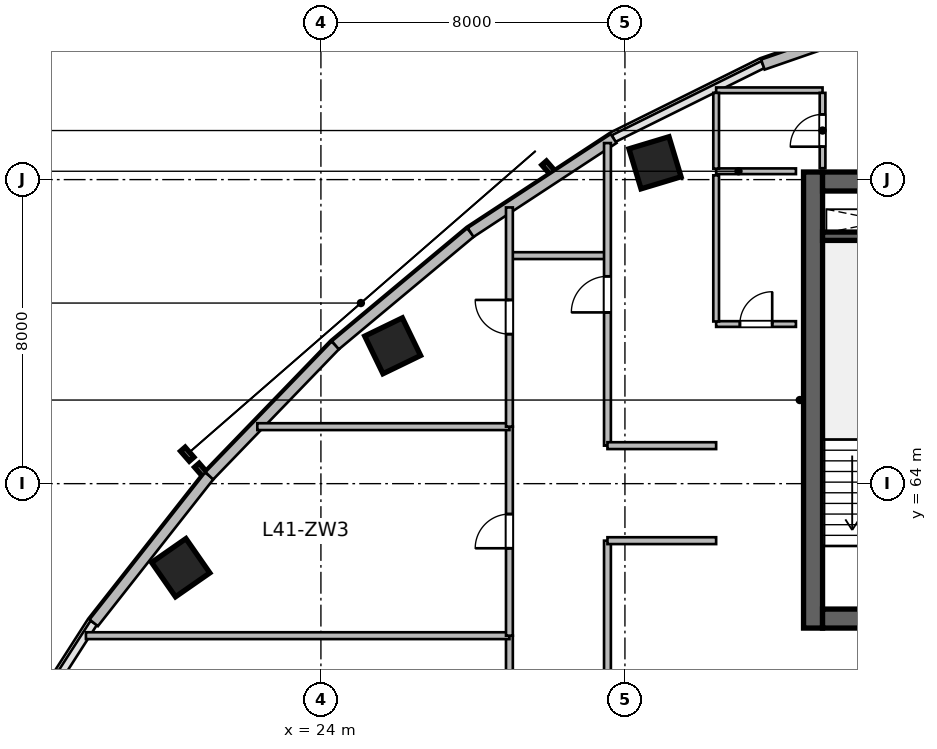
"""IFC4 building model, lengths in metres.
Left out: names, types, materials, properties, quantities, classifications, styles, units other than length and angle.
Written with IfcOpenShell. Run it as: python <this file> out.ifc"""

import sys

from ifc_helpers import new_model, si_unit, direction, frame, frame_2d, origin, origin_2d, place, context, subcontext, project, spatial, rectangle, extrude, source, transform, mapped, element, fill, save


model = new_model("IFC4")
c1 = context("Model", 3, precision=1e-05, world=origin(), true_north=direction((0.0, 1.0)))
c2 = subcontext(c1, "Body", "Model", "MODEL_VIEW")
j1 = project(units=[si_unit("LENGTHUNIT", "METRE"), si_unit("PLANEANGLEUNIT", "RADIAN")], contexts=[c1])
p1 = place(None, origin())
s1 = spatial("IfcSite", under=j1, at=p1, CompositionType="ELEMENT")
p2 = place(p1, origin())
s2 = spatial("IfcBuilding", under=s1, at=p2, CompositionType="ELEMENT")
p3 = place(p2, frame((0.0, 0.0, 170.1)))
s3 = spatial("IfcBuildingStorey", under=s2, at=p3, CompositionType="ELEMENT", Elevation=170.1)
m1 = source(origin(), c2, "Body", "SweptSolid", [
    extrude(rectangle(XDim=12.0, YDim=0.5, at=frame_2d((6.0, 0.0))), origin(), (0.0, 0.0, 1.0), 3.9),
])
p4 = place(p3, frame((36.95, 60.2, 0.0), z_axis=(0.0, 0.0, 1.0), x_axis=(0.0, 1.0, 0.0)))
e1 = element("IfcWall", 1, at=p4, inside=s3, PredefinedType="SHEAR", context=c2, shape_type="MappedRepresentation", body=[
    mapped(m1, transform((0.0, 0.0, 0.0), scale=1.0)),
])
m2 = source(origin(), c2, "Body", "SweptSolid", [
    extrude(rectangle(XDim=21.6, YDim=0.5, at=frame_2d((10.8, 0.0))), origin(), (0.0, 0.0, 1.0), 3.9),
])
p5 = place(p3, frame((37.2, 60.45, 0.0), z_axis=(0.0, 0.0, 1.0), x_axis=(1.0, 0.0, 0.0)))
e2 = element("IfcWall", 2, at=p5, inside=s3, PredefinedType="SHEAR", context=c2, shape_type="MappedRepresentation", body=[
    mapped(m2, transform((0.0, 0.0, 0.0), scale=1.0)),
])
p6 = place(p5, frame((1.1, 0.0, 0.0)))
e3 = element("IfcOpeningElement", 3, at=p6, cuts=e2, PredefinedType="OPENING", context=c2, shape_type="SweptSolid", body=[
    extrude(rectangle(XDim=1.15, YDim=2.15, at=frame_2d((0.575, 1.075))), frame((0.0, 0.26, 0.0), z_axis=(0.0, -1.0, 0.0), x_axis=(1.0, 0.0, 0.0)), (0.0, 0.0, 1.0), 0.52),
])
p7 = place(p5, frame((19.5, 0.0, 0.0)))
e4 = element("IfcOpeningElement", 4, at=p7, cuts=e2, PredefinedType="OPENING", context=c2, shape_type="SweptSolid", body=[
    extrude(rectangle(XDim=0.9, YDim=2.1, at=frame_2d((0.45, 1.05))), frame((0.0, 0.26, 0.0), z_axis=(0.0, -1.0, 0.0), x_axis=(1.0, 0.0, 0.0)), (0.0, 0.0, 1.0), 0.52),
])
p8 = place(p5, frame((12.02, 0.0, 0.0)))
e5 = element("IfcOpeningElement", 5, at=p8, cuts=e2, PredefinedType="OPENING", context=c2, shape_type="SweptSolid", body=[
    extrude(rectangle(XDim=1.6, YDim=2.15, at=frame_2d((0.8, 1.075))), frame((0.0, 0.26, 0.0), z_axis=(0.0, -1.0, 0.0), x_axis=(1.0, 0.0, 0.0)), (0.0, 0.0, 1.0), 0.52),
])
p9 = place(p3, frame((37.2, 71.95, 0.0), z_axis=(0.0, 0.0, 1.0), x_axis=(1.0, 0.0, 0.0)))
e6 = element("IfcWall", 6, at=p9, inside=s3, PredefinedType="SHEAR", context=c2, shape_type="MappedRepresentation", body=[
    mapped(m2, transform((0.0, 0.0, 0.0), scale=1.0)),
])
p10 = place(p9, frame((1.2, 0.0, 0.0)))
e7 = element("IfcOpeningElement", 7, at=p10, cuts=e6, PredefinedType="OPENING", context=c2, shape_type="SweptSolid", body=[
    extrude(rectangle(XDim=0.9, YDim=2.1, at=frame_2d((0.45, 1.05))), frame((0.0, 0.26, 0.0), z_axis=(0.0, -1.0, 0.0), x_axis=(1.0, 0.0, 0.0)), (0.0, 0.0, 1.0), 0.52),
])
p11 = place(p9, frame((14.7, 0.0, 0.0)))
e8 = element("IfcOpeningElement", 8, at=p11, cuts=e6, PredefinedType="OPENING", context=c2, shape_type="SweptSolid", body=[
    extrude(rectangle(XDim=1.2, YDim=2.15, at=frame_2d((0.6, 1.075))), frame((0.0, 0.26, 0.0), z_axis=(0.0, -1.0, 0.0), x_axis=(1.0, 0.0, 0.0)), (0.0, 0.0, 1.0), 0.52),
])
p12 = place(p9, frame((4.15, 0.0, 0.0)))
e9 = element("IfcOpeningElement", 9, at=p12, cuts=e6, PredefinedType="OPENING", context=c2, shape_type="SweptSolid", body=[
    extrude(rectangle(XDim=1.3, YDim=2.15, at=frame_2d((0.65, 1.075))), frame((0.0, 0.26, 0.0), z_axis=(0.0, -1.0, 0.0), x_axis=(1.0, 0.0, 0.0)), (0.0, 0.0, 1.0), 0.52),
])
p13 = place(p9, frame((7.25, 0.0, 0.0)))
e10 = element("IfcOpeningElement", 10, at=p13, cuts=e6, PredefinedType="OPENING", context=c2, shape_type="SweptSolid", body=[
    extrude(rectangle(XDim=0.9, YDim=2.1, at=frame_2d((0.45, 1.05))), frame((0.0, 0.26, 0.0), z_axis=(0.0, -1.0, 0.0), x_axis=(1.0, 0.0, 0.0)), (0.0, 0.0, 1.0), 0.52),
])
p14 = place(p9, frame((10.95, 0.0, 0.0)))
e11 = element("IfcOpeningElement", 11, at=p14, cuts=e6, PredefinedType="OPENING", context=c2, shape_type="SweptSolid", body=[
    extrude(rectangle(XDim=0.9, YDim=2.1, at=frame_2d((0.45, 1.05))), frame((0.0, 0.26, 0.0), z_axis=(0.0, -1.0, 0.0), x_axis=(1.0, 0.0, 0.0)), (0.0, 0.0, 1.0), 0.52),
])
m3 = source(origin(), c2, "Body", "SweptSolid", [
    extrude(rectangle(XDim=3.27, YDim=0.22, at=frame_2d((1.635, 0.0))), origin(), (0.0, 0.0, 1.0), 3.9),
])
p15 = place(p3, frame((37.2, 70.51, 0.0), z_axis=(0.0, 0.0, 1.0), x_axis=(1.0, 0.0, 0.0)))
e12 = element("IfcWall", 12, at=p15, inside=s3, PredefinedType="SHEAR", context=c2, shape_type="MappedRepresentation", body=[
    mapped(m3, transform((0.0, 0.0, 0.0), scale=1.0)),
])
m4 = source(origin(), c2, "Body", "SweptSolid", [
    extrude(rectangle(XDim=1.1, YDim=1.1, at=origin_2d()), origin(), (0.0, 0.0, 1.0), 3.9),
])
for number, where, z_axis, x_axis in (
    (13, (20.311, 61.789, 0.0), (0.0, 0.0, 1.0), (-0.571, 0.821, 0.0)),
    (14, (25.888, 67.627, 0.0), (0.0, 0.0, 1.0), (-0.436, 0.9, 0.0)),
    (15, (32.791, 72.442, 0.0), (0.0, 0.0, 1.0), (-0.289, 0.957, 0.0)),
):
    element("IfcColumn", number, at=place(p3, frame(where, z_axis=z_axis, x_axis=x_axis)), inside=s3, PredefinedType="COLUMN", context=c2, shape_type="MappedRepresentation", body=[
        mapped(m4, transform((0.0, 0.0, 0.0), scale=1.0)),
    ])
m5 = source(origin(), c2, "Body", "SweptSolid", [
    extrude(rectangle(XDim=4.922, YDim=0.28, at=frame_2d((2.461, 0.0))), origin(), (0.0, 0.0, 1.0), 3.65),
])
p16 = place(p3, frame((18.021, 60.338, 0.0), z_axis=(0.0, 0.0, 1.0), x_axis=(0.61817639101, 0.786039407153, 0.0)))
e16 = element("IfcWall", 16, at=p16, inside=s3, PredefinedType="SOLIDWALL", context=c2, shape_type="MappedRepresentation", body=[
    mapped(m5, transform((0.0, 0.0, 0.0), scale=1.0)),
])
m6 = source(origin(), c2, "Body", "SweptSolid", [
    extrude(rectangle(XDim=4.776, YDim=0.28, at=frame_2d((2.388, 0.0))), origin(), (0.0, 0.0, 1.0), 3.65),
])
p17 = place(p3, frame((21.064, 64.206, 0.0), z_axis=(0.0, 0.0, 1.0), x_axis=(0.694601811851, 0.719394414055, 0.0)))
e17 = element("IfcWall", 17, at=p17, inside=s3, PredefinedType="SOLIDWALL", context=c2, shape_type="MappedRepresentation", body=[
    mapped(m6, transform((0.0, 0.0, 0.0), scale=1.0)),
])
m7 = source(origin(), c2, "Body", "SweptSolid", [
    extrude(rectangle(XDim=4.634, YDim=0.28, at=frame_2d((2.317, 0.0))), origin(), (0.0, 0.0, 1.0), 3.65),
])
p18 = place(p3, frame((24.381, 67.642, 0.0), z_axis=(0.0, 0.0, 1.0), x_axis=(0.767910229096, 0.640557475993, 0.0)))
e18 = element("IfcWall", 18, at=p18, inside=s3, PredefinedType="SOLIDWALL", context=c2, shape_type="MappedRepresentation", body=[
    mapped(m7, transform((0.0, 0.0, 0.0), scale=1.0)),
])
m8 = source(origin(), c2, "Body", "SweptSolid", [
    extrude(rectangle(XDim=4.501, YDim=0.28, at=frame_2d((2.25, 0.0))), origin(), (0.0, 0.0, 1.0), 3.65),
])
p19 = place(p3, frame((27.939, 70.61, 0.0), z_axis=(0.0, 0.0, 1.0), x_axis=(0.835984920737, 0.548752414391, 0.0)))
e19 = element("IfcWall", 19, at=p19, inside=s3, PredefinedType="SOLIDWALL", context=c2, shape_type="MappedRepresentation", body=[
    mapped(m8, transform((0.0, 0.0, 0.0), scale=1.0)),
])
m9 = source(origin(), c2, "Body", "SweptSolid", [
    extrude(rectangle(XDim=4.29, YDim=0.28, at=frame_2d((2.145, 0.0))), origin(), (0.0, 0.0, 1.0), 3.65),
])
p20 = place(p3, frame((35.63, 75.027, 0.0), z_axis=(0.0, 0.0, 1.0), x_axis=(0.944883859218, 0.3274057003, 0.0)))
e20 = element("IfcWall", 20, at=p20, inside=s3, PredefinedType="SOLIDWALL", context=c2, shape_type="MappedRepresentation", body=[
    mapped(m9, transform((0.0, 0.0, 0.0), scale=1.0)),
])
m10 = source(origin(), c2, "Body", "SweptSolid", [
    extrude(rectangle(XDim=2.1, YDim=0.15, at=frame_2d((1.05, 0.0))), origin(), (0.0, 0.0, 1.0), 3.65),
])
p21 = place(p3, frame((34.4, 72.22, 0.0), z_axis=(0.0, 0.0, 1.0), x_axis=(1.0, 0.0, 0.0)))
e21 = element("IfcWall", 21, at=p21, inside=s3, PredefinedType="PARTITIONING", context=c2, shape_type="MappedRepresentation", body=[
    mapped(m10, transform((0.0, 0.0, 0.0), scale=1.0)),
])
m11 = source(origin(), c2, "Body", "SweptSolid", [
    extrude(rectangle(XDim=2.8, YDim=0.15, at=frame_2d((1.4, 0.0))), origin(), (0.0, 0.0, 1.0), 3.65),
])
p22 = place(p3, frame((34.4, 74.35, 0.0), z_axis=(0.0, 0.0, 1.0), x_axis=(1.0, 0.0, 0.0)))
e22 = element("IfcWall", 22, at=p22, inside=s3, PredefinedType="PARTITIONING", context=c2, shape_type="MappedRepresentation", body=[
    mapped(m11, transform((0.0, 0.0, 0.0), scale=1.0)),
])
m12 = source(origin(), c2, "Body", "SweptSolid", [
    extrude(rectangle(XDim=1.995, YDim=0.15, at=frame_2d((0.998, 0.0))), origin(), (0.0, 0.0, 1.0), 3.65),
])
p23 = place(p3, frame((34.4, 72.288, 0.0), z_axis=(0.0, 0.0, 1.0), x_axis=(0.0, 1.0, 0.0)))
e23 = element("IfcWall", 23, at=p23, inside=s3, PredefinedType="PARTITIONING", context=c2, shape_type="MappedRepresentation", body=[
    mapped(m12, transform((0.0, 0.0, 0.0), scale=1.0)),
])
m13 = source(origin(), c2, "Body", "SweptSolid", [
    extrude(rectangle(XDim=1.982, YDim=0.15, at=frame_2d((0.991, 0.0))), origin(), (0.0, 0.0, 1.0), 3.65),
])
p24 = place(p3, frame((37.2, 72.3, 0.0), z_axis=(0.0, 0.0, 1.0), x_axis=(0.0, 1.0, 0.0)))
e24 = element("IfcWall", 24, at=p24, inside=s3, PredefinedType="PARTITIONING", context=c2, shape_type="MappedRepresentation", body=[
    mapped(m13, transform((0.0, 0.0, 0.0), scale=1.0)),
])
p25 = place(p24, frame((0.566, 0.0, 0.0)))
e25 = element("IfcOpeningElement", 25, at=p25, cuts=e24, PredefinedType="OPENING", context=c2, shape_type="SweptSolid", body=[
    extrude(rectangle(XDim=0.85, YDim=2.1, at=frame_2d((0.425, 1.05))), frame((0.0, 0.085, 0.0), z_axis=(0.0, -1.0, 0.0), x_axis=(1.0, 0.0, 0.0)), (0.0, 0.0, 1.0), 0.17),
])
p26 = place(p3, frame((34.4, 68.2, 0.0), z_axis=(0.0, 0.0, 1.0), x_axis=(1.0, 0.0, 0.0)))
e26 = element("IfcWall", 26, at=p26, inside=s3, PredefinedType="PARTITIONING", context=c2, shape_type="MappedRepresentation", body=[
    mapped(m10, transform((0.0, 0.0, 0.0), scale=1.0)),
])
p27 = place(p26, frame((0.625, 0.0, 0.0)))
e27 = element("IfcOpeningElement", 27, at=p27, cuts=e26, PredefinedType="OPENING", context=c2, shape_type="SweptSolid", body=[
    extrude(rectangle(XDim=0.85, YDim=2.1, at=frame_2d((0.425, 1.05))), frame((0.0, 0.085, 0.0), z_axis=(0.0, -1.0, 0.0), x_axis=(1.0, 0.0, 0.0)), (0.0, 0.0, 1.0), 0.17),
])
m14 = source(origin(), c2, "Body", "SweptSolid", [
    extrude(rectangle(XDim=3.845, YDim=0.15, at=frame_2d((1.922, 0.0))), origin(), (0.0, 0.0, 1.0), 3.65),
])
p28 = place(p3, frame((34.4, 68.268, 0.0), z_axis=(0.0, 0.0, 1.0), x_axis=(0.0, 1.0, 0.0)))
e28 = element("IfcWall", 28, at=p28, inside=s3, PredefinedType="PARTITIONING", context=c2, shape_type="MappedRepresentation", body=[
    mapped(m14, transform((0.0, 0.0, 0.0), scale=1.0)),
])
m15 = source(origin(), c2, "Body", "SweptSolid", [
    extrude(rectangle(XDim=2.5, YDim=0.18, at=frame_2d((1.25, 0.0))), origin(), (0.0, 0.0, 1.0), 3.022),
])
p29 = place(p3, frame((29.0, 70.0, 0.0), z_axis=(0.0, 0.0, 1.0), x_axis=(1.0, 0.0, 0.0)))
e29 = element("IfcWall", 29, at=p29, inside=s3, PredefinedType="PLUMBINGWALL", context=c2, shape_type="MappedRepresentation", body=[
    mapped(m15, transform((0.0, 0.0, 0.0), scale=1.0)),
])
m16 = source(origin(), c2, "Body", "SweptSolid", [
    extrude(rectangle(XDim=6.5, YDim=0.18, at=frame_2d((3.25, 0.0))), origin(), (0.0, 0.0, 1.0), 3.081),
])
p30 = place(p3, frame((28.96, 53.5, 0.0), z_axis=(0.0, 0.0, 1.0), x_axis=(0.0, 1.0, 0.0)))
e30 = element("IfcWall", 30, at=p30, inside=s3, PredefinedType="PLUMBINGWALL", context=c2, shape_type="MappedRepresentation", body=[
    mapped(m16, transform((0.0, 0.0, 0.0), scale=1.0)),
])
p31 = place(p30, frame((2.8, 0.0, 0.0)))
e31 = element("IfcOpeningElement", 31, at=p31, cuts=e30, PredefinedType="OPENING", context=c2, shape_type="SweptSolid", body=[
    extrude(rectangle(XDim=0.9, YDim=2.08, at=frame_2d((0.45, 1.04))), frame((0.0, 0.1, 0.0), z_axis=(0.0, -1.0, 0.0), x_axis=(1.0, 0.0, 0.0)), (0.0, 0.0, 1.0), 0.2),
])
m17 = source(origin(), c2, "Body", "SweptSolid", [
    extrude(rectangle(XDim=11.144, YDim=0.18, at=frame_2d((5.572, 0.0))), origin(), (0.0, 0.0, 1.0), 3.65),
])
p32 = place(p3, frame((17.816, 60.0, 0.0), z_axis=(0.0, 0.0, 1.0), x_axis=(1.0, 0.0, 0.0)))
e32 = element("IfcWall", 32, at=p32, inside=s3, PredefinedType="PLUMBINGWALL", context=c2, shape_type="MappedRepresentation", body=[
    mapped(m17, transform((0.0, 0.0, 0.0), scale=1.0)),
])
m18 = source(origin(), c2, "Body", "SweptSolid", [
    extrude(rectangle(XDim=5.5, YDim=0.18, at=frame_2d((2.75, 0.0))), origin(), (0.0, 0.0, 1.0), 2.942),
])
p33 = place(p3, frame((28.96, 60.0, 0.0), z_axis=(0.0, 0.0, 1.0), x_axis=(0.0, 1.0, 0.0)))
e33 = element("IfcWall", 33, at=p33, inside=s3, PredefinedType="PLUMBINGWALL", context=c2, shape_type="MappedRepresentation", body=[
    mapped(m18, transform((0.0, 0.0, 0.0), scale=1.0)),
])
p34 = place(p33, frame((2.3, 0.0, 0.0)))
e34 = element("IfcOpeningElement", 34, at=p34, cuts=e33, PredefinedType="OPENING", context=c2, shape_type="SweptSolid", body=[
    extrude(rectangle(XDim=0.9, YDim=2.08, at=frame_2d((0.45, 1.04))), frame((0.0, 0.1, 0.0), z_axis=(0.0, -1.0, 0.0), x_axis=(1.0, 0.0, 0.0)), (0.0, 0.0, 1.0), 0.2),
])
m19 = source(origin(), c2, "Body", "SweptSolid", [
    extrude(rectangle(XDim=6.633, YDim=0.18, at=frame_2d((3.317, 0.0))), origin(), (0.0, 0.0, 1.0), 3.65),
])
p35 = place(p3, frame((22.327, 65.5, 0.0), z_axis=(0.0, 0.0, 1.0), x_axis=(1.0, 0.0, 0.0)))
e35 = element("IfcWall", 35, at=p35, inside=s3, PredefinedType="PLUMBINGWALL", context=c2, shape_type="MappedRepresentation", body=[
    mapped(m19, transform((0.0, 0.0, 0.0), scale=1.0)),
])
m20 = source(origin(), c2, "Body", "SweptSolid", [
    extrude(rectangle(XDim=5.768, YDim=0.18, at=frame_2d((2.884, 0.0))), origin(), (0.0, 0.0, 1.0), 3.65),
])
p36 = place(p3, frame((28.96, 65.5, 0.0), z_axis=(0.0, 0.0, 1.0), x_axis=(0.0, 1.0, 0.0)))
e36 = element("IfcWall", 36, at=p36, inside=s3, PredefinedType="PLUMBINGWALL", context=c2, shape_type="MappedRepresentation", body=[
    mapped(m20, transform((0.0, 0.0, 0.0), scale=1.0)),
])
p37 = place(p36, frame((2.434, 0.0, 0.0)))
e37 = element("IfcOpeningElement", 37, at=p37, cuts=e36, PredefinedType="OPENING", context=c2, shape_type="SweptSolid", body=[
    extrude(rectangle(XDim=0.9, YDim=2.08, at=frame_2d((0.45, 1.04))), frame((0.0, 0.1, 0.0), z_axis=(0.0, -1.0, 0.0), x_axis=(1.0, 0.0, 0.0)), (0.0, 0.0, 1.0), 0.2),
])
m21 = source(origin(), c2, "Body", "SweptSolid", [
    extrude(rectangle(XDim=16.106, YDim=0.18, at=frame_2d((8.053, 0.0))), origin(), (0.0, 0.0, 1.0), 2.942),
])
p38 = place(p3, frame((31.54, 46.394, 0.0), z_axis=(0.0, 0.0, 1.0), x_axis=(0.0, 1.0, 0.0)))
e38 = element("IfcWall", 38, at=p38, inside=s3, PredefinedType="PLUMBINGWALL", context=c2, shape_type="MappedRepresentation", body=[
    mapped(m21, transform((0.0, 0.0, 0.0), scale=1.0)),
])
p39 = place(p38, frame((7.578, 0.0, 0.0)))
e39 = element("IfcOpeningElement", 39, at=p39, cuts=e38, PredefinedType="OPENING", context=c2, shape_type="SweptSolid", body=[
    extrude(rectangle(XDim=0.95, YDim=2.1, at=frame_2d((0.475, 1.05))), frame((0.0, 0.1, 0.0), z_axis=(0.0, -1.0, 0.0), x_axis=(1.0, 0.0, 0.0)), (0.0, 0.0, 1.0), 0.2),
])
m22 = source(origin(), c2, "Body", "SweptSolid", [
    extrude(rectangle(XDim=2.86, YDim=0.18, at=frame_2d((1.43, 0.0))), origin(), (0.0, 0.0, 1.0), 3.65),
])
p40 = place(p3, frame((31.54, 62.5, 0.0), z_axis=(0.0, 0.0, 1.0), x_axis=(1.0, 0.0, 0.0)))
e40 = element("IfcWall", 40, at=p40, inside=s3, PredefinedType="PLUMBINGWALL", context=c2, shape_type="MappedRepresentation", body=[
    mapped(m22, transform((0.0, 0.0, 0.0), scale=1.0)),
])
m23 = source(origin(), c2, "Body", "SweptSolid", [
    extrude(rectangle(XDim=7.962, YDim=0.18, at=frame_2d((3.981, 0.0))), origin(), (0.0, 0.0, 1.0), 3.65),
])
p41 = place(p3, frame((31.54, 65.0, 0.0), z_axis=(0.0, 0.0, 1.0), x_axis=(0.0, 1.0, 0.0)))
e41 = element("IfcWall", 41, at=p41, inside=s3, PredefinedType="PLUMBINGWALL", context=c2, shape_type="MappedRepresentation", body=[
    mapped(m23, transform((0.0, 0.0, 0.0), scale=1.0)),
])
p42 = place(p41, frame((3.506, 0.0, 0.0)))
e42 = element("IfcOpeningElement", 42, at=p42, cuts=e41, PredefinedType="OPENING", context=c2, shape_type="SweptSolid", body=[
    extrude(rectangle(XDim=0.95, YDim=2.1, at=frame_2d((0.475, 1.05))), frame((0.0, 0.1, 0.0), z_axis=(0.0, -1.0, 0.0), x_axis=(1.0, 0.0, 0.0)), (0.0, 0.0, 1.0), 0.2),
])
p43 = place(p3, frame((31.54, 65.0, 0.0), z_axis=(0.0, 0.0, 1.0), x_axis=(1.0, 0.0, 0.0)))
e43 = element("IfcWall", 43, at=p43, inside=s3, PredefinedType="PLUMBINGWALL", context=c2, shape_type="MappedRepresentation", body=[
    mapped(m22, transform((0.0, 0.0, 0.0), scale=1.0)),
])
m24 = source(origin(), c2, "Body", "SweptSolid", [
    extrude(rectangle(XDim=0.85, YDim=2.1, at=frame_2d((0.425, 1.05))), frame((0.0, 0.025, 0.0), z_axis=(0.0, -1.0, 0.0), x_axis=(1.0, 0.0, 0.0)), (0.0, 0.0, 1.0), 0.05),
])
p44 = place(p25, origin())
e44 = element("IfcDoor", 44, at=p44, inside=s3, OperationType="SINGLE_SWING_LEFT", PredefinedType="DOOR", context=c2, shape_type="MappedRepresentation", body=[
    mapped(m24, transform((0.0, 0.0, 0.0), scale=1.0)),
])
fill(e25, e44)
p45 = place(p27, origin())
e45 = element("IfcDoor", 45, at=p45, inside=s3, OperationType="SINGLE_SWING_RIGHT", PredefinedType="DOOR", context=c2, shape_type="MappedRepresentation", body=[
    mapped(m24, transform((0.0, 0.0, 0.0), scale=1.0)),
])
fill(e27, e45)
m25 = source(origin(), c2, "Body", "SweptSolid", [
    extrude(rectangle(XDim=0.9, YDim=2.08, at=frame_2d((0.45, 1.04))), frame((0.0, 0.025, 0.0), z_axis=(0.0, -1.0, 0.0), x_axis=(1.0, 0.0, 0.0)), (0.0, 0.0, 1.0), 0.05),
])
p46 = place(p34, origin())
e46 = element("IfcDoor", 46, at=p46, inside=s3, OperationType="SINGLE_SWING_LEFT", PredefinedType="DOOR", context=c2, shape_type="MappedRepresentation", body=[
    mapped(m25, transform((0.0, 0.0, 0.0), scale=1.0)),
])
fill(e34, e46)
p47 = place(p37, origin())
e47 = element("IfcDoor", 47, at=p47, inside=s3, OperationType="SINGLE_SWING_RIGHT", PredefinedType="DOOR", context=c2, shape_type="MappedRepresentation", body=[
    mapped(m25, transform((0.0, 0.0, 0.0), scale=1.0)),
])
fill(e37, e47)
m26 = source(origin(), c2, "Body", "SweptSolid", [
    extrude(rectangle(XDim=0.95, YDim=2.1, at=frame_2d((0.475, 1.05))), frame((0.0, 0.025, 0.0), z_axis=(0.0, -1.0, 0.0), x_axis=(1.0, 0.0, 0.0)), (0.0, 0.0, 1.0), 0.05),
])
p48 = place(p42, origin())
e48 = element("IfcDoor", 48, at=p48, inside=s3, OperationType="SINGLE_SWING_LEFT", PredefinedType="DOOR", context=c2, shape_type="MappedRepresentation", body=[
    mapped(m26, transform((0.0, 0.0, 0.0), scale=1.0)),
])
fill(e42, e48)
save(model, sys.argv[1])
